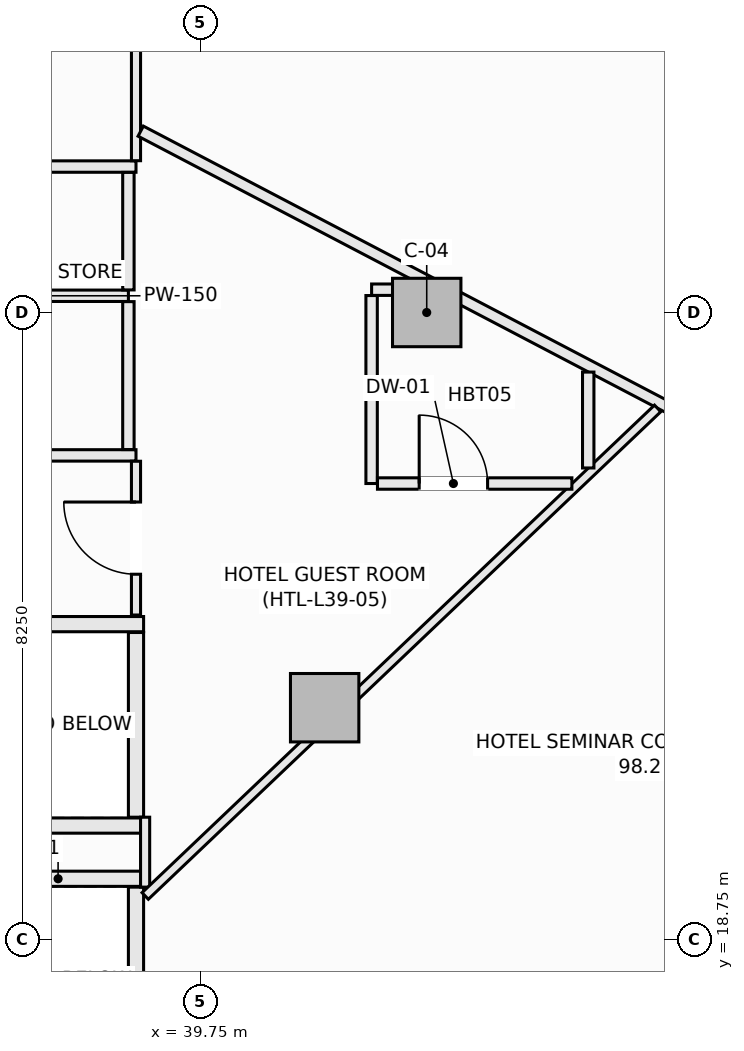
"""IFC4 building model, lengths in metres.
Left out: names, types, materials, properties, quantities, classifications, styles, units other than length and angle.
Written with IfcOpenShell. Run it as: python <this file> out.ifc"""

import sys

from ifc_helpers import new_model, si_unit, direction, frame, frame_2d, origin, origin_2d, place, context, subcontext, project, spatial, rectangle, extrude, element, fill, save


model = new_model("IFC4")
c1 = context("Model", 3, precision=1e-05, world=origin(), true_north=direction((0.0, 1.0)))
c2 = subcontext(c1, "Body", "Model", "MODEL_VIEW")
j1 = project(units=[si_unit("LENGTHUNIT", "METRE"), si_unit("PLANEANGLEUNIT", "RADIAN")], contexts=[c1])
p1 = place(None, origin())
s1 = spatial("IfcSite", under=j1, at=p1, CompositionType="ELEMENT")
p2 = place(p1, origin())
s2 = spatial("IfcBuilding", under=s1, at=p2, CompositionType="ELEMENT")
p3 = place(p2, frame((0.0, 0.0, 152.9)))
s3 = spatial("IfcBuildingStorey", under=s2, at=p3, CompositionType="ELEMENT", Elevation=152.9)
for number, where, z_axis, x_axis in (
    (1, (42.725, 27.0, -0.27), (0.0, 0.0, 1.0), (1.0, 0.0, 0.0)),
    (2, (41.382, 21.801, -0.27), (0.0, 0.0, 1.0), (1.0, 0.0, 0.0)),
):
    element("IfcColumn", number, at=place(p3, frame(where, z_axis=z_axis, x_axis=x_axis)), inside=s3, PredefinedType="COLUMN", context=c2, shape_type="SweptSolid", body=[
        extrude(rectangle(XDim=0.9, YDim=0.9, at=origin_2d()), origin(), (0.0, 0.0, 1.0), 3.4),
    ])
p4 = place(p3, frame((44.313, 15.914, 0.0), z_axis=(0.0, 0.0, 1.0), x_axis=(0.901353070301, 0.433085029363, 0.0)))
e3 = element("IfcWall", 3, at=p4, inside=s3, PredefinedType="SOLIDWALL", context=c2, shape_type="SweptSolid", body=[
    extrude(rectangle(XDim=5.336, YDim=0.3, at=frame_2d((2.668, 0.0))), origin(), (0.0, 0.0, 1.0), 2.653),
])
p5 = place(p4, frame((1.768, 0.0, 0.0)))
e4 = element("IfcOpeningElement", 4, at=p5, cuts=e3, PredefinedType="OPENING", context=c2, shape_type="SweptSolid", body=[
    extrude(rectangle(XDim=1.8, YDim=2.25, at=frame_2d((0.9, 1.125))), frame((0.0, 0.16, 0.0), z_axis=(0.0, -1.0, 0.0), x_axis=(1.0, 0.0, 0.0)), (0.0, 0.0, 1.0), 0.32),
])
p6 = place(p3, frame((36.75, 19.55, 0.0), z_axis=(0.0, 0.0, 1.0), x_axis=(1.0, 0.0, 0.0)))
e5 = element("IfcWall", 5, at=p6, inside=s3, PredefinedType="SOLIDWALL", context=c2, shape_type="SweptSolid", body=[
    extrude(rectangle(XDim=2.25, YDim=0.2, at=frame_2d((1.125, 0.0))), origin(), (0.0, 0.0, 1.0), 3.13),
])
p7 = place(p3, frame((38.9, 17.01, 0.0), z_axis=(0.0, 0.0, 1.0), x_axis=(0.0, 1.0, 0.0)))
e6 = element("IfcWall", 6, at=p7, inside=s3, PredefinedType="SOLIDWALL", context=c2, shape_type="SweptSolid", body=[
    extrude(rectangle(XDim=2.43, YDim=0.2, at=frame_2d((1.215, 0.0))), origin(), (0.0, 0.0, 1.0), 3.13),
])
for number, where, z_axis, x_axis in (
    (7, (36.75, 22.9, 0.0), (0.0, 0.0, 1.0), (1.0, 0.0, 0.0)),
    (8, (36.75, 20.25, 0.0), (0.0, 0.0, 1.0), (1.0, 0.0, 0.0)),
):
    element("IfcWall", number, at=place(p3, frame(where, z_axis=z_axis, x_axis=x_axis)), inside=s3, PredefinedType="SOLIDWALL", context=c2, shape_type="SweptSolid", body=[
        extrude(rectangle(XDim=2.25, YDim=0.2, at=frame_2d((1.125, 0.0))), origin(), (0.0, 0.0, 1.0), 3.13),
    ])
p8 = place(p3, frame((38.9, 20.36, 0.0), z_axis=(0.0, 0.0, 1.0), x_axis=(0.0, 1.0, 0.0)))
e9 = element("IfcWall", 9, at=p8, inside=s3, PredefinedType="SOLIDWALL", context=c2, shape_type="SweptSolid", body=[
    extrude(rectangle(XDim=2.43, YDim=0.2, at=frame_2d((1.215, 0.0))), origin(), (0.0, 0.0, 1.0), 3.13),
])
p9 = place(p3, frame((30.077, 28.92, 0.0), z_axis=(0.0, 0.0, 1.0), x_axis=(1.0, 0.0, 0.0)))
e10 = element("IfcWall", 10, at=p9, inside=s3, PredefinedType="PARTITIONING", context=c2, shape_type="SweptSolid", body=[
    extrude(rectangle(XDim=8.823, YDim=0.15, at=frame_2d((4.412, 0.0))), origin(), (0.0, 0.0, 1.0), 3.13),
])
p10 = place(p9, frame((1.342, 0.0, 0.0)))
e11 = element("IfcOpeningElement", 11, at=p10, cuts=e10, PredefinedType="OPENING", context=c2, shape_type="SweptSolid", body=[
    extrude(rectangle(XDim=0.95, YDim=2.1, at=frame_2d((0.475, 1.05))), frame((0.0, 0.085, 0.0), z_axis=(0.0, -1.0, 0.0), x_axis=(1.0, 0.0, 0.0)), (0.0, 0.0, 1.0), 0.17),
])
p11 = place(p9, frame((5.343, 0.0, 0.0)))
e12 = element("IfcOpeningElement", 12, at=p11, cuts=e10, PredefinedType="OPENING", context=c2, shape_type="SweptSolid", body=[
    extrude(rectangle(XDim=0.95, YDim=2.1, at=frame_2d((0.475, 1.05))), frame((0.0, 0.085, 0.0), z_axis=(0.0, -1.0, 0.0), x_axis=(1.0, 0.0, 0.0)), (0.0, 0.0, 1.0), 0.17),
])
p12 = place(p3, frame((33.377, 25.12, 0.0), z_axis=(0.0, 0.0, 1.0), x_axis=(1.0, 0.0, 0.0)))
e13 = element("IfcWall", 13, at=p12, inside=s3, PredefinedType="PARTITIONING", context=c2, shape_type="SweptSolid", body=[
    extrude(rectangle(XDim=5.523, YDim=0.15, at=frame_2d((2.761, 0.0))), origin(), (0.0, 0.0, 1.0), 3.13),
])
p13 = place(p12, frame((2.287, 0.0, 0.0)))
e14 = element("IfcOpeningElement", 14, at=p13, cuts=e13, PredefinedType="OPENING", context=c2, shape_type="SweptSolid", body=[
    extrude(rectangle(XDim=0.95, YDim=2.1, at=frame_2d((0.475, 1.05))), frame((0.0, 0.085, 0.0), z_axis=(0.0, -1.0, 0.0), x_axis=(1.0, 0.0, 0.0)), (0.0, 0.0, 1.0), 0.17),
])
p14 = place(p3, frame((33.377, 27.22, 0.0), z_axis=(0.0, 0.0, 1.0), x_axis=(1.0, 0.0, 0.0)))
e15 = element("IfcWall", 15, at=p14, inside=s3, PredefinedType="PARTITIONING", context=c2, shape_type="SweptSolid", body=[
    extrude(rectangle(XDim=5.423, YDim=0.15, at=frame_2d((2.711, 0.0))), origin(), (0.0, 0.0, 1.0), 3.13),
])
p15 = place(p3, frame((38.8, 25.197, 0.0), z_axis=(0.0, 0.0, 1.0), x_axis=(0.0, 1.0, 0.0)))
e16 = element("IfcWall", 16, at=p15, inside=s3, PredefinedType="PARTITIONING", context=c2, shape_type="SweptSolid", body=[
    extrude(rectangle(XDim=1.946, YDim=0.15, at=frame_2d((0.973, 0.0))), origin(), (0.0, 0.0, 1.0), 3.13),
])
p16 = place(p3, frame((38.8, 27.297, 0.0), z_axis=(0.0, 0.0, 1.0), x_axis=(0.0, 1.0, 0.0)))
e17 = element("IfcWall", 17, at=p16, inside=s3, PredefinedType="PARTITIONING", context=c2, shape_type="SweptSolid", body=[
    extrude(rectangle(XDim=1.546, YDim=0.15, at=frame_2d((0.773, 0.0))), origin(), (0.0, 0.0, 1.0), 3.13),
])
p17 = place(p3, frame((39.02, 19.44, 0.0), z_axis=(0.0, 0.0, 1.0), x_axis=(0.0, 1.0, 0.0)))
e18 = element("IfcWall", 18, at=p17, inside=s3, PredefinedType="PARTITIONING", context=c2, shape_type="SweptSolid", body=[
    extrude(rectangle(XDim=0.92, YDim=0.12, at=frame_2d((0.46, 0.0))), origin(), (0.0, 0.0, 1.0), 3.13),
])
p18 = place(p3, frame((38.9, 23.02, 0.0), z_axis=(0.0, 0.0, 1.0), x_axis=(0.0, 1.0, 0.0)))
e19 = element("IfcWall", 19, at=p18, inside=s3, PredefinedType="PARTITIONING", context=c2, shape_type="SweptSolid", body=[
    extrude(rectangle(XDim=2.023, YDim=0.12, at=frame_2d((1.011, 0.0))), origin(), (0.0, 0.0, 1.0), 3.13),
])
p19 = place(p18, frame((0.537, 0.0, 0.0)))
e20 = element("IfcOpeningElement", 20, at=p19, cuts=e19, PredefinedType="OPENING", context=c2, shape_type="SweptSolid", body=[
    extrude(rectangle(XDim=0.95, YDim=2.1, at=frame_2d((0.475, 1.05))), frame((0.0, 0.07, 0.0), z_axis=(0.0, -1.0, 0.0), x_axis=(1.0, 0.0, 0.0)), (0.0, 0.0, 1.0), 0.14),
])
p20 = place(p3, frame((38.9, 28.997, 0.0), z_axis=(0.0, 0.0, 1.0), x_axis=(0.0, 1.0, 0.0)))
e21 = element("IfcWall", 21, at=p20, inside=s3, PredefinedType="PARTITIONING", context=c2, shape_type="SweptSolid", body=[
    extrude(rectangle(XDim=2.123, YDim=0.12, at=frame_2d((1.062, 0.0))), origin(), (0.0, 0.0, 1.0), 3.13),
])
p21 = place(p3, frame((38.962, 29.386, 0.0), z_axis=(0.0, 0.0, 1.0), x_axis=(0.885905291329, -0.463866160434, 0.0)))
e22 = element("IfcWall", 22, at=p21, inside=s3, PredefinedType="PARTITIONING", context=c2, shape_type="SweptSolid", body=[
    extrude(rectangle(XDim=13.863, YDim=0.15, at=frame_2d((6.931, 0.0))), origin(), (0.0, 0.0, 1.0), 2.505),
])
p22 = place(p3, frame((39.021, 19.324, 0.0), z_axis=(0.0, 0.0, 1.0), x_axis=(0.724517158733, 0.689256763986, 0.0)))
e23 = element("IfcWall", 23, at=p22, inside=s3, PredefinedType="PARTITIONING", context=c2, shape_type="SweptSolid", body=[
    extrude(rectangle(XDim=9.306, YDim=0.12, at=frame_2d((4.653, 0.0))), origin(), (0.0, 0.0, 1.0), 2.505),
])
p23 = place(p3, frame((42.0, 27.3, 0.0), z_axis=(0.0, 0.0, 1.0), x_axis=(1.0, 0.0, 0.0)))
e24 = element("IfcWall", 24, at=p23, inside=s3, PredefinedType="PARTITIONING", context=c2, shape_type="SweptSolid", body=[
    extrude(rectangle(XDim=0.78, YDim=0.15, at=frame_2d((0.39, 0.0))), origin(), (0.0, 0.0, 1.0), 3.13),
])
p24 = place(p3, frame((42.0, 24.75, 0.0), z_axis=(0.0, 0.0, 1.0), x_axis=(0.0, 1.0, 0.0)))
e25 = element("IfcWall", 25, at=p24, inside=s3, PredefinedType="PARTITIONING", context=c2, shape_type="SweptSolid", body=[
    extrude(rectangle(XDim=2.473, YDim=0.15, at=frame_2d((1.236, 0.0))), origin(), (0.0, 0.0, 1.0), 2.505),
])
p25 = place(p3, frame((42.077, 24.75, 0.0), z_axis=(0.0, 0.0, 1.0), x_axis=(1.0, 0.0, 0.0)))
e26 = element("IfcWall", 26, at=p25, inside=s3, PredefinedType="PARTITIONING", context=c2, shape_type="SweptSolid", body=[
    extrude(rectangle(XDim=2.558, YDim=0.15, at=frame_2d((1.279, 0.0))), origin(), (0.0, 0.0, 1.0), 3.13),
])
p26 = place(p25, frame((0.549, 0.0, 0.0)))
e27 = element("IfcOpeningElement", 27, at=p26, cuts=e26, PredefinedType="OPENING", context=c2, shape_type="SweptSolid", body=[
    extrude(rectangle(XDim=0.9, YDim=2.1, at=frame_2d((0.45, 1.05))), frame((0.0, 0.085, 0.0), z_axis=(0.0, -1.0, 0.0), x_axis=(1.0, 0.0, 0.0)), (0.0, 0.0, 1.0), 0.17),
])
p27 = place(p3, frame((44.85, 24.955, 0.0), z_axis=(0.0, 0.0, 1.0), x_axis=(0.0, 1.0, 0.0)))
e28 = element("IfcWall", 28, at=p27, inside=s3, PredefinedType="PARTITIONING", context=c2, shape_type="SweptSolid", body=[
    extrude(rectangle(XDim=1.261, YDim=0.15, at=frame_2d((0.631, 0.0))), origin(), (0.0, 0.0, 1.0), 3.13),
])
p28 = place(p19, origin())
e29 = element("IfcDoor", 29, at=p28, inside=s3, OperationType="SINGLE_SWING_RIGHT", PredefinedType="DOOR", context=c2, shape_type="SweptSolid", body=[
    extrude(rectangle(XDim=0.95, YDim=2.1, at=frame_2d((0.475, 1.05))), frame((0.0, 0.025, 0.0), z_axis=(0.0, -1.0, 0.0), x_axis=(1.0, 0.0, 0.0)), (0.0, 0.0, 1.0), 0.05),
])
fill(e20, e29)
p29 = place(p26, origin())
e30 = element("IfcDoor", 30, at=p29, inside=s3, OperationType="SINGLE_SWING_LEFT", PredefinedType="DOOR", context=c2, shape_type="SweptSolid", body=[
    extrude(rectangle(XDim=0.9, YDim=2.1, at=frame_2d((0.45, 1.05))), frame((0.0, 0.025, 0.0), z_axis=(0.0, -1.0, 0.0), x_axis=(1.0, 0.0, 0.0)), (0.0, 0.0, 1.0), 0.05),
])
fill(e27, e30)
save(model, sys.argv[1])
